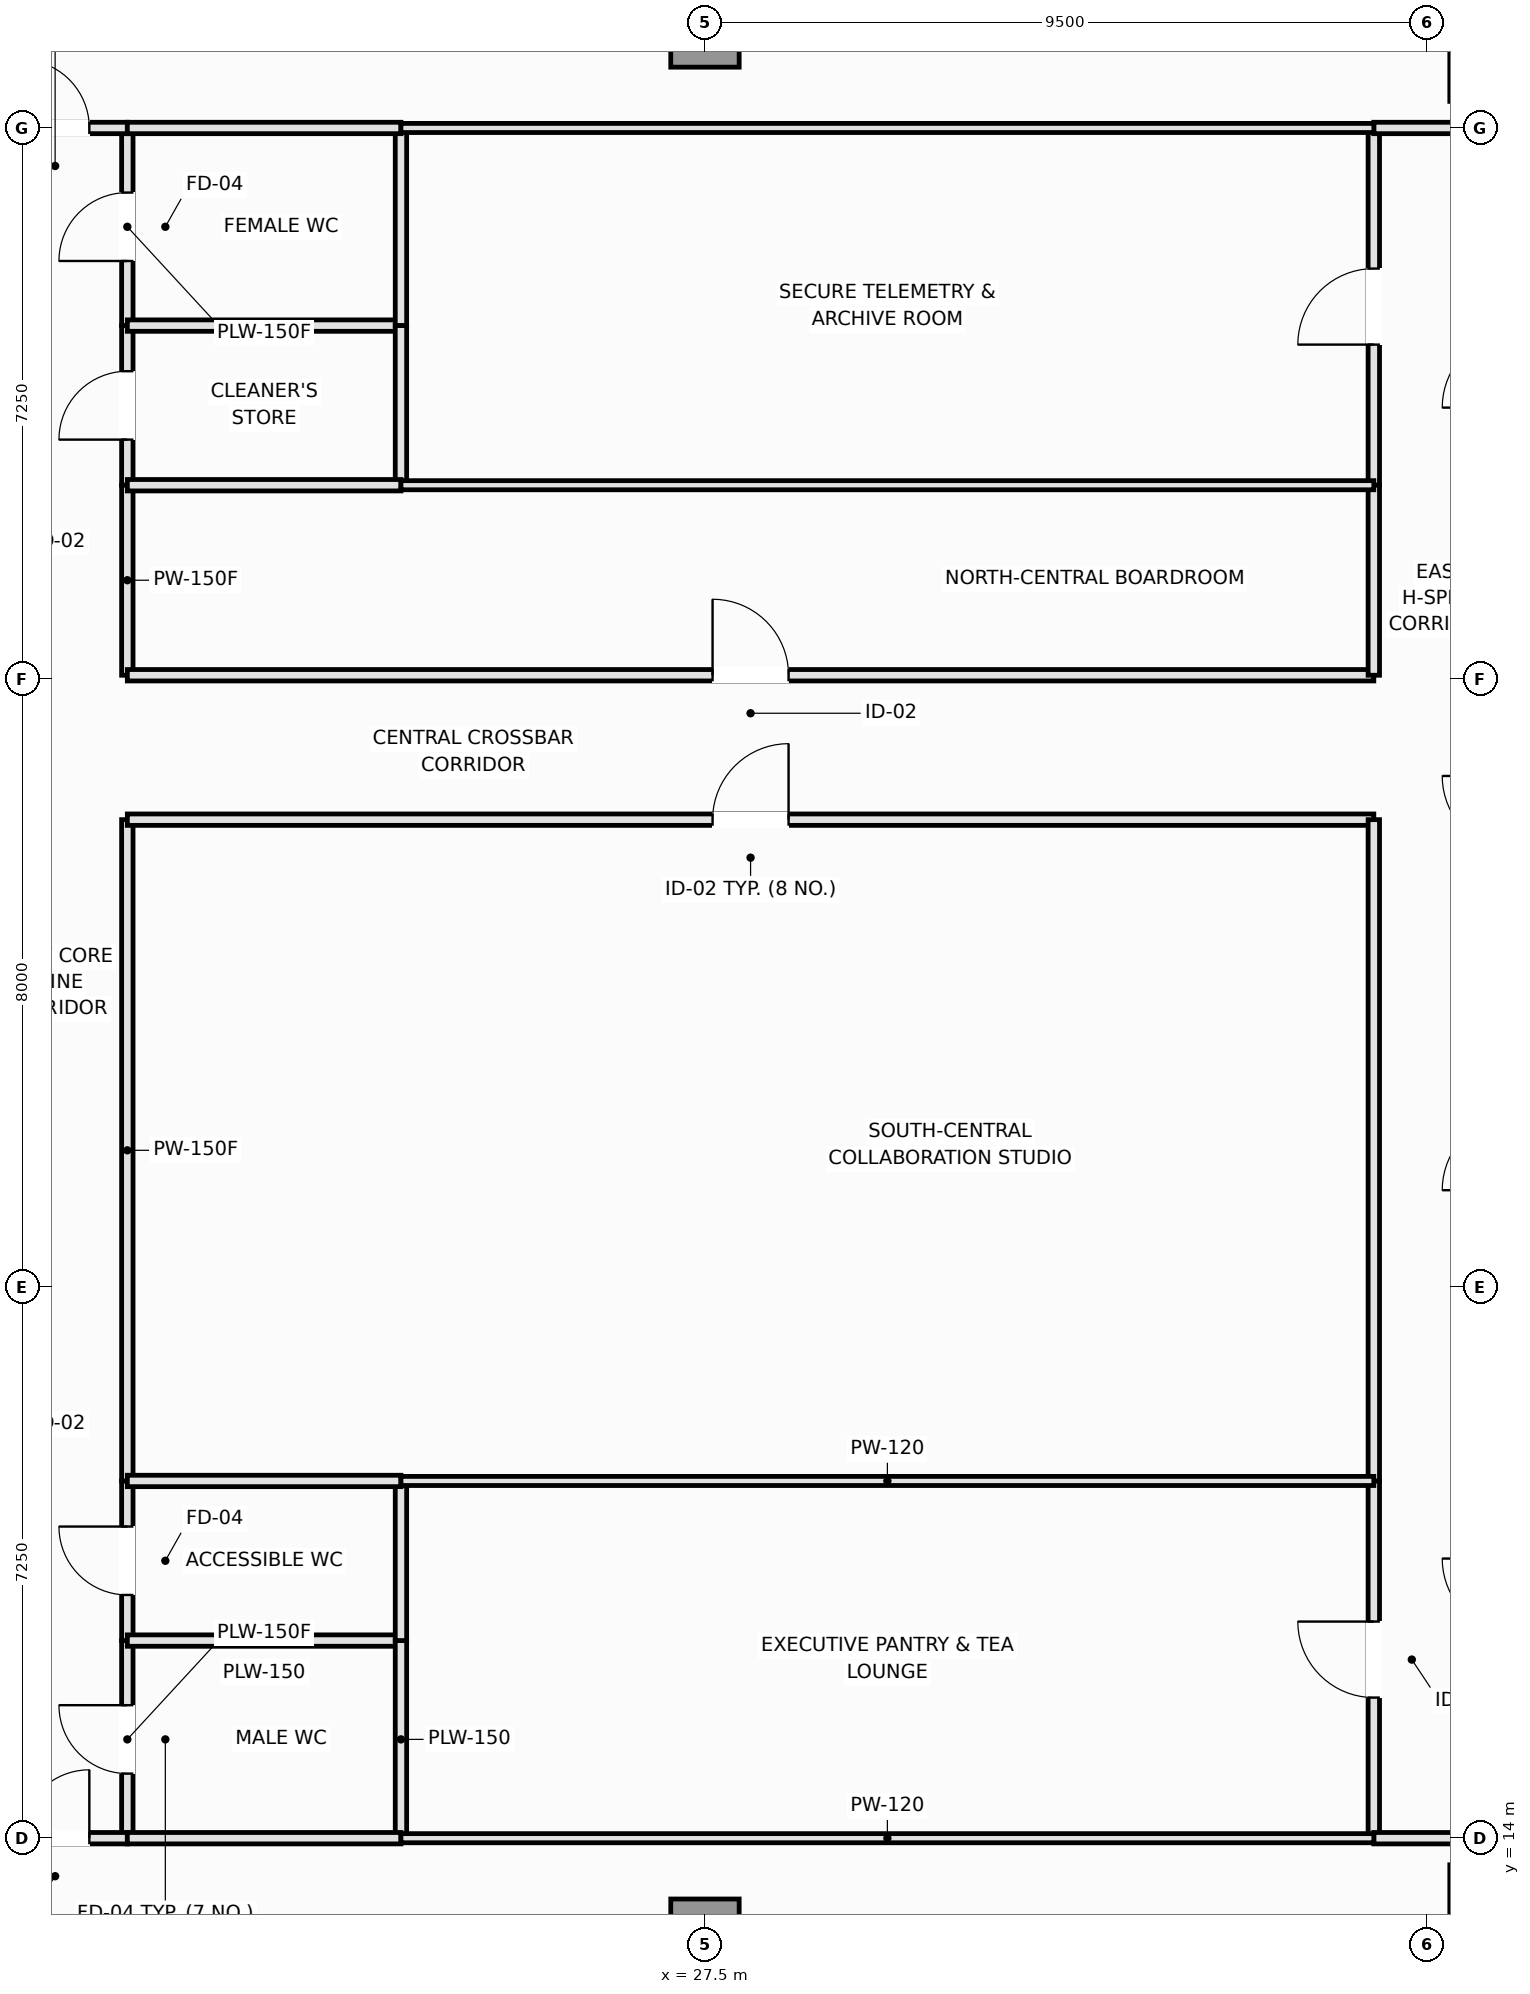
"""IFC4 building model, lengths in metres.
Left out: names, types, materials, properties, quantities, classifications, styles, units other than length and angle.
Written with IfcOpenShell. Run it as: python <this file> out.ifc"""

import sys

from ifc_helpers import new_model, si_unit, direction, frame, frame_2d, origin, origin_2d, place, context, subcontext, project, spatial, rectangle, extrude, element, fill, save


model = new_model("IFC4")
c1 = context("Model", 3, precision=1e-05, world=origin(), true_north=direction((0.0, 1.0)))
c2 = subcontext(c1, "Body", "Model", "MODEL_VIEW")
j1 = project(units=[si_unit("LENGTHUNIT", "METRE"), si_unit("PLANEANGLEUNIT", "RADIAN")], contexts=[c1])
p1 = place(None, origin())
s1 = spatial("IfcSite", under=j1, at=p1, CompositionType="ELEMENT")
p2 = place(p1, origin())
s2 = spatial("IfcBuilding", under=s1, at=p2, CompositionType="ELEMENT")
p3 = place(p2, frame((0.0, 0.0, 209.35)))
s3 = spatial("IfcBuildingStorey", under=s2, at=p3, CompositionType="ELEMENT", Elevation=209.35)
for number, where, z_axis, x_axis in (
    (1, (38.2, 12.75, 0.0), (0.0, 0.0, 1.0), (1.0, 0.0, 0.0)),
    (2, (38.2, 37.75, 0.0), (0.0, 0.0, 1.0), (1.0, 0.0, 0.0)),
):
    element("IfcColumn", number, at=place(p3, frame(where, z_axis=z_axis, x_axis=x_axis)), inside=s3, PredefinedType="COLUMN", context=c2, shape_type="SweptSolid", body=[
        extrude(rectangle(XDim=1.8, YDim=1.8, at=origin_2d()), origin(), (0.0, 0.0, 1.0), 3.55),
    ])
for number, where, z_axis, x_axis in (
    (3, (27.5, 12.75, 0.0), (0.0, 0.0, 1.0), (1.0, 0.0, 0.0)),
    (4, (27.5, 37.75, 0.0), (0.0, 0.0, 1.0), (1.0, 0.0, 0.0)),
):
    element("IfcColumn", number, at=place(p3, frame(where, z_axis=z_axis, x_axis=x_axis)), inside=s3, PredefinedType="COLUMN", context=c2, shape_type="SweptSolid", body=[
        extrude(rectangle(XDim=0.9, YDim=0.9, at=origin_2d()), origin(), (0.0, 0.0, 1.0), 3.55),
    ])
p4 = place(p3, frame((19.9, 14.0, 0.0), z_axis=(0.0, 0.0, 1.0), x_axis=(0.0, 1.0, 0.0)))
e5 = element("IfcWall", 5, at=p4, inside=s3, PredefinedType="PLUMBINGWALL", context=c2, shape_type="SweptSolid", body=[
    extrude(rectangle(XDim=2.6, YDim=0.15, at=frame_2d((1.3, 0.0))), origin(), (0.0, 0.0, 1.0), 3.37),
])
p5 = place(p4, frame((0.85, 0.0, 0.0)))
e6 = element("IfcOpeningElement", 6, at=p5, cuts=e5, PredefinedType="OPENING", context=c2, shape_type="SweptSolid", body=[
    extrude(rectangle(XDim=0.9, YDim=2.1, at=frame_2d((0.45, 1.05))), frame((0.0, 0.085, 0.0), z_axis=(0.0, -1.0, 0.0), x_axis=(1.0, 0.0, 0.0)), (0.0, 0.0, 1.0), 0.17),
])
p6 = place(p3, frame((19.9, 33.9, 0.0), z_axis=(0.0, 0.0, 1.0), x_axis=(0.0, 1.0, 0.0)))
e7 = element("IfcWall", 7, at=p6, inside=s3, PredefinedType="PLUMBINGWALL", context=c2, shape_type="SweptSolid", body=[
    extrude(rectangle(XDim=2.6, YDim=0.15, at=frame_2d((1.3, 0.0))), origin(), (0.0, 0.0, 1.0), 3.37),
])
p7 = place(p6, frame((0.85, 0.0, 0.0)))
e8 = element("IfcOpeningElement", 8, at=p7, cuts=e7, PredefinedType="OPENING", context=c2, shape_type="SweptSolid", body=[
    extrude(rectangle(XDim=0.9, YDim=2.1, at=frame_2d((0.45, 1.05))), frame((0.0, 0.085, 0.0), z_axis=(0.0, -1.0, 0.0), x_axis=(1.0, 0.0, 0.0)), (0.0, 0.0, 1.0), 0.17),
])
p8 = place(p3, frame((19.9, 16.6, 0.0), z_axis=(0.0, 0.0, 1.0), x_axis=(0.0, 1.0, 0.0)))
e9 = element("IfcWall", 9, at=p8, inside=s3, PredefinedType="PLUMBINGWALL", context=c2, shape_type="SweptSolid", body=[
    extrude(rectangle(XDim=2.1, YDim=0.15, at=frame_2d((1.05, 0.0))), origin(), (0.0, 0.0, 1.0), 3.37),
])
p9 = place(p8, frame((0.6, 0.0, 0.0)))
e10 = element("IfcOpeningElement", 10, at=p9, cuts=e9, PredefinedType="OPENING", context=c2, shape_type="SweptSolid", body=[
    extrude(rectangle(XDim=0.9, YDim=2.1, at=frame_2d((0.45, 1.05))), frame((0.0, 0.085, 0.0), z_axis=(0.0, -1.0, 0.0), x_axis=(1.0, 0.0, 0.0)), (0.0, 0.0, 1.0), 0.17),
])
p10 = place(p3, frame((19.9, 31.8, 0.0), z_axis=(0.0, 0.0, 1.0), x_axis=(0.0, 1.0, 0.0)))
e11 = element("IfcWall", 11, at=p10, inside=s3, PredefinedType="PLUMBINGWALL", context=c2, shape_type="SweptSolid", body=[
    extrude(rectangle(XDim=2.1, YDim=0.15, at=frame_2d((1.05, 0.0))), origin(), (0.0, 0.0, 1.0), 3.37),
])
p11 = place(p10, frame((0.6, 0.0, 0.0)))
e12 = element("IfcOpeningElement", 12, at=p11, cuts=e11, PredefinedType="OPENING", context=c2, shape_type="SweptSolid", body=[
    extrude(rectangle(XDim=0.9, YDim=2.1, at=frame_2d((0.45, 1.05))), frame((0.0, 0.085, 0.0), z_axis=(0.0, -1.0, 0.0), x_axis=(1.0, 0.0, 0.0)), (0.0, 0.0, 1.0), 0.17),
])
p12 = place(p3, frame((19.9, 18.7, 0.0), z_axis=(0.0, 0.0, 1.0), x_axis=(0.0, 1.0, 0.0)))
e13 = element("IfcWall", 13, at=p12, inside=s3, PredefinedType="PARTITIONING", context=c2, shape_type="SweptSolid", body=[
    extrude(rectangle(XDim=8.7, YDim=0.15, at=frame_2d((4.35, 0.0))), origin(), (0.0, 0.0, 1.0), 3.37),
])
p13 = place(p3, frame((19.9, 29.3, 0.0), z_axis=(0.0, 0.0, 1.0), x_axis=(0.0, 1.0, 0.0)))
e14 = element("IfcWall", 14, at=p13, inside=s3, PredefinedType="PARTITIONING", context=c2, shape_type="SweptSolid", body=[
    extrude(rectangle(XDim=2.5, YDim=0.15, at=frame_2d((1.25, 0.0))), origin(), (0.0, 0.0, 1.0), 3.37),
])
p14 = place(p3, frame((18.0, 14.0, 0.0), z_axis=(0.0, 0.0, 1.0), x_axis=(1.0, 0.0, 0.0)))
e15 = element("IfcWall", 15, at=p14, inside=s3, PredefinedType="PARTITIONING", context=c2, shape_type="SweptSolid", body=[
    extrude(rectangle(XDim=1.9, YDim=0.15, at=frame_2d((0.95, 0.0))), origin(), (0.0, 0.0, 1.0), 3.37),
])
p15 = place(p14, frame((0.5, 0.0, 0.0)))
e16 = element("IfcOpeningElement", 16, at=p15, cuts=e15, PredefinedType="OPENING", context=c2, shape_type="SweptSolid", body=[
    extrude(rectangle(XDim=0.9, YDim=2.1, at=frame_2d((0.45, 1.05))), frame((0.0, 0.085, 0.0), z_axis=(0.0, -1.0, 0.0), x_axis=(1.0, 0.0, 0.0)), (0.0, 0.0, 1.0), 0.17),
])
p16 = place(p3, frame((18.0, 36.5, 0.0), z_axis=(0.0, 0.0, 1.0), x_axis=(1.0, 0.0, 0.0)))
e17 = element("IfcWall", 17, at=p16, inside=s3, PredefinedType="PARTITIONING", context=c2, shape_type="SweptSolid", body=[
    extrude(rectangle(XDim=1.9, YDim=0.15, at=frame_2d((0.95, 0.0))), origin(), (0.0, 0.0, 1.0), 3.37),
])
p17 = place(p16, frame((0.5, 0.0, 0.0)))
e18 = element("IfcOpeningElement", 18, at=p17, cuts=e17, PredefinedType="OPENING", context=c2, shape_type="SweptSolid", body=[
    extrude(rectangle(XDim=0.9, YDim=2.1, at=frame_2d((0.45, 1.05))), frame((0.0, 0.085, 0.0), z_axis=(0.0, -1.0, 0.0), x_axis=(1.0, 0.0, 0.0)), (0.0, 0.0, 1.0), 0.17),
])
p18 = place(p3, frame((19.9, 27.4, 0.0), z_axis=(0.0, 0.0, 1.0), x_axis=(1.0, 0.0, 0.0)))
e19 = element("IfcWall", 19, at=p18, inside=s3, PredefinedType="PARTITIONING", context=c2, shape_type="SweptSolid", body=[
    extrude(rectangle(XDim=16.4, YDim=0.15, at=frame_2d((8.2, 0.0))), origin(), (0.0, 0.0, 1.0), 3.37),
])
p19 = place(p18, frame((7.7, 0.0, 0.0)))
e20 = element("IfcOpeningElement", 20, at=p19, cuts=e19, PredefinedType="OPENING", context=c2, shape_type="SweptSolid", body=[
    extrude(rectangle(XDim=1.0, YDim=2.15, at=frame_2d((0.5, 1.075))), frame((0.0, 0.085, 0.0), z_axis=(0.0, -1.0, 0.0), x_axis=(1.0, 0.0, 0.0)), (0.0, 0.0, 1.0), 0.17),
])
p20 = place(p3, frame((19.9, 29.3, 0.0), z_axis=(0.0, 0.0, 1.0), x_axis=(1.0, 0.0, 0.0)))
e21 = element("IfcWall", 21, at=p20, inside=s3, PredefinedType="PARTITIONING", context=c2, shape_type="SweptSolid", body=[
    extrude(rectangle(XDim=16.4, YDim=0.15, at=frame_2d((8.2, 0.0))), origin(), (0.0, 0.0, 1.0), 3.37),
])
p21 = place(p20, frame((7.7, 0.0, 0.0)))
e22 = element("IfcOpeningElement", 22, at=p21, cuts=e21, PredefinedType="OPENING", context=c2, shape_type="SweptSolid", body=[
    extrude(rectangle(XDim=1.0, YDim=2.15, at=frame_2d((0.5, 1.075))), frame((0.0, 0.085, 0.0), z_axis=(0.0, -1.0, 0.0), x_axis=(1.0, 0.0, 0.0)), (0.0, 0.0, 1.0), 0.17),
])
p22 = place(p3, frame((36.3, 14.0, 0.0), z_axis=(0.0, 0.0, 1.0), x_axis=(0.0, 1.0, 0.0)))
e23 = element("IfcWall", 23, at=p22, inside=s3, PredefinedType="PARTITIONING", context=c2, shape_type="SweptSolid", body=[
    extrude(rectangle(XDim=4.7, YDim=0.15, at=frame_2d((2.35, 0.0))), origin(), (0.0, 0.0, 1.0), 3.37),
])
p23 = place(p22, frame((1.85, 0.0, 0.0)))
e24 = element("IfcOpeningElement", 24, at=p23, cuts=e23, PredefinedType="OPENING", context=c2, shape_type="SweptSolid", body=[
    extrude(rectangle(XDim=1.0, YDim=2.15, at=frame_2d((0.5, 1.075))), frame((0.0, 0.085, 0.0), z_axis=(0.0, -1.0, 0.0), x_axis=(1.0, 0.0, 0.0)), (0.0, 0.0, 1.0), 0.17),
])
p24 = place(p3, frame((36.3, 31.8, 0.0), z_axis=(0.0, 0.0, 1.0), x_axis=(0.0, 1.0, 0.0)))
e25 = element("IfcWall", 25, at=p24, inside=s3, PredefinedType="PARTITIONING", context=c2, shape_type="SweptSolid", body=[
    extrude(rectangle(XDim=4.7, YDim=0.15, at=frame_2d((2.35, 0.0))), origin(), (0.0, 0.0, 1.0), 3.37),
])
p25 = place(p24, frame((1.85, 0.0, 0.0)))
e26 = element("IfcOpeningElement", 26, at=p25, cuts=e25, PredefinedType="OPENING", context=c2, shape_type="SweptSolid", body=[
    extrude(rectangle(XDim=1.0, YDim=2.15, at=frame_2d((0.5, 1.075))), frame((0.0, 0.085, 0.0), z_axis=(0.0, -1.0, 0.0), x_axis=(1.0, 0.0, 0.0)), (0.0, 0.0, 1.0), 0.17),
])
p26 = place(p3, frame((36.3, 18.7, 0.0), z_axis=(0.0, 0.0, 1.0), x_axis=(0.0, 1.0, 0.0)))
e27 = element("IfcWall", 27, at=p26, inside=s3, PredefinedType="PARTITIONING", context=c2, shape_type="SweptSolid", body=[
    extrude(rectangle(XDim=8.7, YDim=0.15, at=frame_2d((4.35, 0.0))), origin(), (0.0, 0.0, 1.0), 3.37),
])
p27 = place(p3, frame((36.3, 29.3, 0.0), z_axis=(0.0, 0.0, 1.0), x_axis=(0.0, 1.0, 0.0)))
e28 = element("IfcWall", 28, at=p27, inside=s3, PredefinedType="PARTITIONING", context=c2, shape_type="SweptSolid", body=[
    extrude(rectangle(XDim=2.5, YDim=0.15, at=frame_2d((1.25, 0.0))), origin(), (0.0, 0.0, 1.0), 3.37),
])
for number, where, z_axis, x_axis in (
    (29, (36.3, 14.0, 0.0), (0.0, 0.0, 1.0), (1.0, 0.0, 0.0)),
    (30, (36.3, 36.5, 0.0), (0.0, 0.0, 1.0), (1.0, 0.0, 0.0)),
):
    element("IfcWall", number, at=place(p3, frame(where, z_axis=z_axis, x_axis=x_axis)), inside=s3, PredefinedType="PARTITIONING", context=c2, shape_type="SweptSolid", body=[
        extrude(rectangle(XDim=1.9, YDim=0.15, at=frame_2d((0.95, 0.0))), origin(), (0.0, 0.0, 1.0), 3.37),
    ])
p28 = place(p3, frame((19.9, 16.6, 0.0), z_axis=(0.0, 0.0, 1.0), x_axis=(1.0, 0.0, 0.0)))
e31 = element("IfcWall", 31, at=p28, inside=s3, PredefinedType="PLUMBINGWALL", context=c2, shape_type="SweptSolid", body=[
    extrude(rectangle(XDim=3.6, YDim=0.15, at=frame_2d((1.8, 0.0))), origin(), (0.0, 0.0, 1.0), 3.37),
])
p29 = place(p3, frame((23.5, 14.0, 0.0), z_axis=(0.0, 0.0, 1.0), x_axis=(0.0, 1.0, 0.0)))
e32 = element("IfcWall", 32, at=p29, inside=s3, PredefinedType="PLUMBINGWALL", context=c2, shape_type="SweptSolid", body=[
    extrude(rectangle(XDim=2.6, YDim=0.15, at=frame_2d((1.3, 0.0))), origin(), (0.0, 0.0, 1.0), 3.37),
])
for number, where, z_axis, x_axis in (
    (33, (19.9, 14.0, 0.0), (0.0, 0.0, 1.0), (1.0, 0.0, 0.0)),
    (34, (19.9, 33.9, 0.0), (0.0, 0.0, 1.0), (1.0, 0.0, 0.0)),
):
    element("IfcWall", number, at=place(p3, frame(where, z_axis=z_axis, x_axis=x_axis)), inside=s3, PredefinedType="PLUMBINGWALL", context=c2, shape_type="SweptSolid", body=[
        extrude(rectangle(XDim=3.6, YDim=0.15, at=frame_2d((1.8, 0.0))), origin(), (0.0, 0.0, 1.0), 3.37),
    ])
p30 = place(p3, frame((23.5, 33.9, 0.0), z_axis=(0.0, 0.0, 1.0), x_axis=(0.0, 1.0, 0.0)))
e35 = element("IfcWall", 35, at=p30, inside=s3, PredefinedType="PLUMBINGWALL", context=c2, shape_type="SweptSolid", body=[
    extrude(rectangle(XDim=2.6, YDim=0.15, at=frame_2d((1.3, 0.0))), origin(), (0.0, 0.0, 1.0), 3.37),
])
p31 = place(p3, frame((19.9, 36.5, 0.0), z_axis=(0.0, 0.0, 1.0), x_axis=(1.0, 0.0, 0.0)))
e36 = element("IfcWall", 36, at=p31, inside=s3, PredefinedType="PLUMBINGWALL", context=c2, shape_type="SweptSolid", body=[
    extrude(rectangle(XDim=3.6, YDim=0.15, at=frame_2d((1.8, 0.0))), origin(), (0.0, 0.0, 1.0), 3.37),
])
p32 = place(p3, frame((23.5, 16.6, 0.0), z_axis=(0.0, 0.0, 1.0), x_axis=(0.0, 1.0, 0.0)))
e37 = element("IfcWall", 37, at=p32, inside=s3, PredefinedType="PLUMBINGWALL", context=c2, shape_type="SweptSolid", body=[
    extrude(rectangle(XDim=2.1, YDim=0.15, at=frame_2d((1.05, 0.0))), origin(), (0.0, 0.0, 1.0), 3.37),
])
p33 = place(p3, frame((19.9, 18.7, 0.0), z_axis=(0.0, 0.0, 1.0), x_axis=(1.0, 0.0, 0.0)))
e38 = element("IfcWall", 38, at=p33, inside=s3, PredefinedType="PLUMBINGWALL", context=c2, shape_type="SweptSolid", body=[
    extrude(rectangle(XDim=3.6, YDim=0.15, at=frame_2d((1.8, 0.0))), origin(), (0.0, 0.0, 1.0), 3.37),
])
p34 = place(p3, frame((23.5, 31.8, 0.0), z_axis=(0.0, 0.0, 1.0), x_axis=(0.0, 1.0, 0.0)))
e39 = element("IfcWall", 39, at=p34, inside=s3, PredefinedType="PLUMBINGWALL", context=c2, shape_type="SweptSolid", body=[
    extrude(rectangle(XDim=2.1, YDim=0.15, at=frame_2d((1.05, 0.0))), origin(), (0.0, 0.0, 1.0), 3.37),
])
p35 = place(p3, frame((19.9, 31.8, 0.0), z_axis=(0.0, 0.0, 1.0), x_axis=(1.0, 0.0, 0.0)))
e40 = element("IfcWall", 40, at=p35, inside=s3, PredefinedType="PLUMBINGWALL", context=c2, shape_type="SweptSolid", body=[
    extrude(rectangle(XDim=3.6, YDim=0.15, at=frame_2d((1.8, 0.0))), origin(), (0.0, 0.0, 1.0), 3.37),
])
for number, where, z_axis, x_axis in (
    (41, (23.5, 18.7, 0.0), (0.0, 0.0, 1.0), (1.0, 0.0, 0.0)),
    (42, (23.5, 14.0, 0.0), (0.0, 0.0, 1.0), (1.0, 0.0, 0.0)),
    (43, (23.5, 31.8, 0.0), (0.0, 0.0, 1.0), (1.0, 0.0, 0.0)),
    (44, (23.5, 36.5, 0.0), (0.0, 0.0, 1.0), (1.0, 0.0, 0.0)),
):
    element("IfcWall", number, at=place(p3, frame(where, z_axis=z_axis, x_axis=x_axis)), inside=s3, PredefinedType="PARTITIONING", context=c2, shape_type="SweptSolid", body=[
        extrude(rectangle(XDim=12.8, YDim=0.12, at=frame_2d((6.4, 0.0))), origin(), (0.0, 0.0, 1.0), 3.37),
    ])
p36 = place(p5, origin())
e45 = element("IfcDoor", 45, at=p36, inside=s3, OperationType="SINGLE_SWING_RIGHT", PredefinedType="DOOR", context=c2, shape_type="SweptSolid", body=[
    extrude(rectangle(XDim=0.9, YDim=2.1, at=frame_2d((0.45, 1.05))), frame((0.0, 0.025, 0.0), z_axis=(0.0, -1.0, 0.0), x_axis=(1.0, 0.0, 0.0)), (0.0, 0.0, 1.0), 0.05),
])
fill(e6, e45)
p37 = place(p7, origin())
e46 = element("IfcDoor", 46, at=p37, inside=s3, OperationType="SINGLE_SWING_LEFT", PredefinedType="DOOR", context=c2, shape_type="SweptSolid", body=[
    extrude(rectangle(XDim=0.9, YDim=2.1, at=frame_2d((0.45, 1.05))), frame((0.0, 0.025, 0.0), z_axis=(0.0, -1.0, 0.0), x_axis=(1.0, 0.0, 0.0)), (0.0, 0.0, 1.0), 0.05),
])
fill(e8, e46)
p38 = place(p9, origin())
e47 = element("IfcDoor", 47, at=p38, inside=s3, OperationType="SINGLE_SWING_RIGHT", PredefinedType="DOOR", context=c2, shape_type="SweptSolid", body=[
    extrude(rectangle(XDim=0.9, YDim=2.1, at=frame_2d((0.45, 1.05))), frame((0.0, 0.025, 0.0), z_axis=(0.0, -1.0, 0.0), x_axis=(1.0, 0.0, 0.0)), (0.0, 0.0, 1.0), 0.05),
])
fill(e10, e47)
p39 = place(p11, origin())
e48 = element("IfcDoor", 48, at=p39, inside=s3, OperationType="SINGLE_SWING_LEFT", PredefinedType="DOOR", context=c2, shape_type="SweptSolid", body=[
    extrude(rectangle(XDim=0.9, YDim=2.1, at=frame_2d((0.45, 1.05))), frame((0.0, 0.025, 0.0), z_axis=(0.0, -1.0, 0.0), x_axis=(1.0, 0.0, 0.0)), (0.0, 0.0, 1.0), 0.05),
])
fill(e12, e48)
p40 = place(p15, origin())
e49 = element("IfcDoor", 49, at=p40, inside=s3, OperationType="SINGLE_SWING_RIGHT", PredefinedType="DOOR", context=c2, shape_type="SweptSolid", body=[
    extrude(rectangle(XDim=0.9, YDim=2.1, at=frame_2d((0.45, 1.05))), frame((0.0, 0.025, 0.0), z_axis=(0.0, -1.0, 0.0), x_axis=(1.0, 0.0, 0.0)), (0.0, 0.0, 1.0), 0.05),
])
fill(e16, e49)
p41 = place(p17, origin())
e50 = element("IfcDoor", 50, at=p41, inside=s3, OperationType="SINGLE_SWING_LEFT", PredefinedType="DOOR", context=c2, shape_type="SweptSolid", body=[
    extrude(rectangle(XDim=0.9, YDim=2.1, at=frame_2d((0.45, 1.05))), frame((0.0, 0.025, 0.0), z_axis=(0.0, -1.0, 0.0), x_axis=(1.0, 0.0, 0.0)), (0.0, 0.0, 1.0), 0.05),
])
fill(e18, e50)
p42 = place(p19, origin())
e51 = element("IfcDoor", 51, at=p42, inside=s3, OperationType="SINGLE_SWING_RIGHT", PredefinedType="DOOR", context=c2, shape_type="SweptSolid", body=[
    extrude(rectangle(XDim=1.0, YDim=2.15, at=frame_2d((0.5, 1.075))), frame((0.0, 0.025, 0.0), z_axis=(0.0, -1.0, 0.0), x_axis=(1.0, 0.0, 0.0)), (0.0, 0.0, 1.0), 0.05),
])
fill(e20, e51)
p43 = place(p21, origin())
e52 = element("IfcDoor", 52, at=p43, inside=s3, OperationType="SINGLE_SWING_LEFT", PredefinedType="DOOR", context=c2, shape_type="SweptSolid", body=[
    extrude(rectangle(XDim=1.0, YDim=2.15, at=frame_2d((0.5, 1.075))), frame((0.0, 0.025, 0.0), z_axis=(0.0, -1.0, 0.0), x_axis=(1.0, 0.0, 0.0)), (0.0, 0.0, 1.0), 0.05),
])
fill(e22, e52)
p44 = place(p23, origin())
e53 = element("IfcDoor", 53, at=p44, inside=s3, OperationType="SINGLE_SWING_RIGHT", PredefinedType="DOOR", context=c2, shape_type="SweptSolid", body=[
    extrude(rectangle(XDim=1.0, YDim=2.15, at=frame_2d((0.5, 1.075))), frame((0.0, 0.025, 0.0), z_axis=(0.0, -1.0, 0.0), x_axis=(1.0, 0.0, 0.0)), (0.0, 0.0, 1.0), 0.05),
])
fill(e24, e53)
p45 = place(p25, origin())
e54 = element("IfcDoor", 54, at=p45, inside=s3, OperationType="SINGLE_SWING_LEFT", PredefinedType="DOOR", context=c2, shape_type="SweptSolid", body=[
    extrude(rectangle(XDim=1.0, YDim=2.15, at=frame_2d((0.5, 1.075))), frame((0.0, 0.025, 0.0), z_axis=(0.0, -1.0, 0.0), x_axis=(1.0, 0.0, 0.0)), (0.0, 0.0, 1.0), 0.05),
])
fill(e26, e54)
save(model, sys.argv[1])
